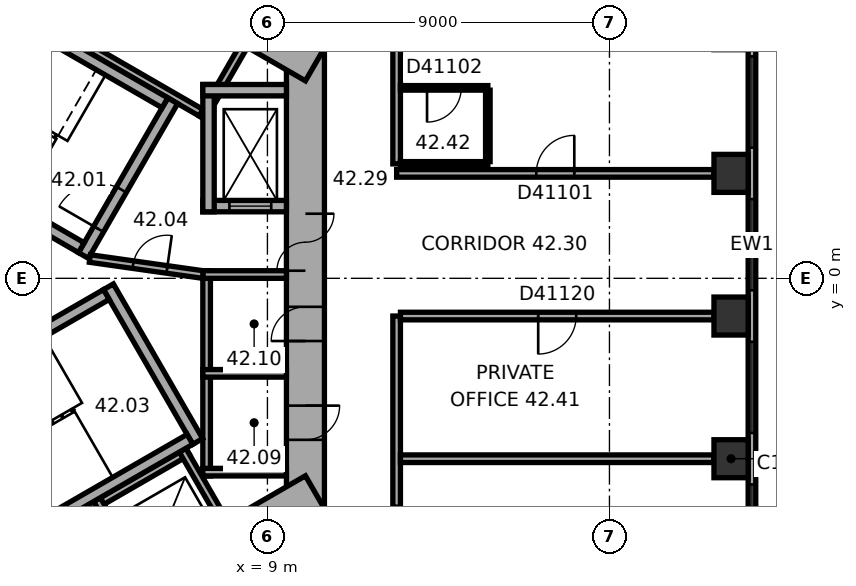
"""IFC4 building model, lengths in metres.
Left out: names, types, materials, properties, quantities, classifications, styles, units other than length and angle.
Written with IfcOpenShell. Run it as: python <this file> out.ifc"""

import sys

from ifc_helpers import new_model, si_unit, direction, frame, frame_2d, origin, origin_2d, place, context, subcontext, project, spatial, rectangle, extrude, element, fill, save


model = new_model("IFC4")
c1 = context("Model", 3, precision=1e-05, world=origin(), true_north=direction((0.0, 1.0)))
c2 = subcontext(c1, "Body", "Model", "MODEL_VIEW")
j1 = project(units=[si_unit("LENGTHUNIT", "METRE"), si_unit("PLANEANGLEUNIT", "RADIAN")], contexts=[c1])
p1 = place(None, origin())
s1 = spatial("IfcSite", under=j1, at=p1, CompositionType="ELEMENT")
p2 = place(p1, origin())
s2 = spatial("IfcBuilding", under=s1, at=p2, CompositionType="ELEMENT")
p3 = place(p2, frame((0.0, 0.0, 172.5)))
s3 = spatial("IfcBuildingStorey", under=s2, at=p3, CompositionType="ELEMENT", Elevation=172.5)
for number, where, z_axis, x_axis in (
    (1, (21.2, -4.747, 0.0), (0.0, 0.0, 1.0), (0.0, 1.0, 0.0)),
    (2, (21.2, -0.993, 0.0), (0.0, 0.0, 1.0), (0.0, 1.0, 0.0)),
    (3, (21.2, 2.761, 0.0), (0.0, 0.0, 1.0), (0.0, 1.0, 0.0)),
):
    element("IfcColumn", number, at=place(p3, frame(where, z_axis=z_axis, x_axis=x_axis)), inside=s3, PredefinedType="COLUMN", context=c2, shape_type="SweptSolid", body=[
        extrude(rectangle(XDim=1.0, YDim=0.9, at=origin_2d()), origin(), (0.0, 0.0, 1.0), 3.7),
    ])
p4 = place(p3, frame((10.0, -6.062, 0.0), z_axis=(0.0, 0.0, 1.0), x_axis=(0.0, 1.0, 0.0)))
e4 = element("IfcWall", 4, at=p4, inside=s3, PredefinedType="SHEAR", context=c2, shape_type="SweptSolid", body=[
    extrude(rectangle(XDim=12.125, YDim=1.0, at=frame_2d((6.062, 0.0))), origin(), (0.0, 0.0, 1.0), 3.7),
])
p5 = place(p4, frame((6.262, 0.0, 0.0)))
e5 = element("IfcOpeningElement", 5, at=p5, cuts=e4, PredefinedType="OPENING", context=c2, shape_type="SweptSolid", body=[
    extrude(rectangle(XDim=1.5, YDim=2.1, at=frame_2d((0.75, 1.05))), frame((0.0, 0.51, 0.0), z_axis=(0.0, -1.0, 0.0), x_axis=(1.0, 0.0, 0.0)), (0.0, 0.0, 1.0), 1.02),
])
p6 = place(p4, frame((1.812, 0.0, 0.0)))
e6 = element("IfcOpeningElement", 6, at=p6, cuts=e4, PredefinedType="OPENING", context=c2, shape_type="SweptSolid", body=[
    extrude(rectangle(XDim=0.9, YDim=2.1, at=frame_2d((0.45, 1.05))), frame((0.0, 0.51, 0.0), z_axis=(0.0, -1.0, 0.0), x_axis=(1.0, 0.0, 0.0)), (0.0, 0.0, 1.0), 1.02),
])
p7 = place(p4, frame((4.412, 0.0, 0.0)))
e7 = element("IfcOpeningElement", 7, at=p7, cuts=e4, PredefinedType="OPENING", context=c2, shape_type="SweptSolid", body=[
    extrude(rectangle(XDim=0.9, YDim=2.1, at=frame_2d((0.45, 1.05))), frame((0.0, 0.51, 0.0), z_axis=(0.0, -1.0, 0.0), x_axis=(1.0, 0.0, 0.0)), (0.0, 0.0, 1.0), 1.02),
])
p8 = place(p3, frame((10.25, 5.629, 0.0), z_axis=(0.0, 0.0, 1.0), x_axis=(-0.866022616891, 0.50000482701, 0.0)))
e8 = element("IfcWall", 8, at=p8, inside=s3, PredefinedType="SHEAR", context=c2, shape_type="SweptSolid", body=[
    extrude(rectangle(XDim=12.125, YDim=1.0, at=frame_2d((6.062, 0.0))), origin(), (0.0, 0.0, 1.0), 3.7),
])
p9 = place(p8, frame((4.012, 0.0, 0.0)))
e9 = element("IfcOpeningElement", 9, at=p9, cuts=e8, PredefinedType="OPENING", context=c2, shape_type="SweptSolid", body=[
    extrude(rectangle(XDim=0.9, YDim=2.1, at=frame_2d((0.45, 1.05))), frame((0.0, 0.51, 0.0), z_axis=(0.0, -1.0, 0.0), x_axis=(1.0, 0.0, 0.0)), (0.0, 0.0, 1.0), 1.02),
])
p10 = place(p8, frame((7.912, 0.0, 0.0)))
e10 = element("IfcOpeningElement", 10, at=p10, cuts=e8, PredefinedType="OPENING", context=c2, shape_type="SweptSolid", body=[
    extrude(rectangle(XDim=0.9, YDim=2.1, at=frame_2d((0.45, 1.05))), frame((0.0, 0.51, 0.0), z_axis=(0.0, -1.0, 0.0), x_axis=(1.0, 0.0, 0.0)), (0.0, 0.0, 1.0), 1.02),
])
p11 = place(p3, frame((-0.25, -11.691, 0.0), z_axis=(0.0, 0.0, 1.0), x_axis=(0.866022616891, 0.50000482701, 0.0)))
e11 = element("IfcWall", 11, at=p11, inside=s3, PredefinedType="SHEAR", context=c2, shape_type="SweptSolid", body=[
    extrude(rectangle(XDim=12.125, YDim=1.0, at=frame_2d((6.062, 0.0))), origin(), (0.0, 0.0, 1.0), 3.7),
])
p12 = place(p11, frame((2.612, 0.0, 0.0)))
e12 = element("IfcOpeningElement", 12, at=p12, cuts=e11, PredefinedType="OPENING", context=c2, shape_type="SweptSolid", body=[
    extrude(rectangle(XDim=1.1, YDim=2.1, at=frame_2d((0.55, 1.05))), frame((0.0, 0.51, 0.0), z_axis=(0.0, -1.0, 0.0), x_axis=(1.0, 0.0, 0.0)), (0.0, 0.0, 1.0), 1.02),
])
p13 = place(p11, frame((5.212, 0.0, 0.0)))
e13 = element("IfcOpeningElement", 13, at=p13, cuts=e11, PredefinedType="OPENING", context=c2, shape_type="SweptSolid", body=[
    extrude(rectangle(XDim=1.1, YDim=2.1, at=frame_2d((0.55, 1.05))), frame((0.0, 0.51, 0.0), z_axis=(0.0, -1.0, 0.0), x_axis=(1.0, 0.0, 0.0)), (0.0, 0.0, 1.0), 1.02),
])
p14 = place(p11, frame((7.812, 0.0, 0.0)))
e14 = element("IfcOpeningElement", 14, at=p14, cuts=e11, PredefinedType="OPENING", context=c2, shape_type="SweptSolid", body=[
    extrude(rectangle(XDim=1.1, YDim=2.1, at=frame_2d((0.55, 1.05))), frame((0.0, 0.51, 0.0), z_axis=(0.0, -1.0, 0.0), x_axis=(1.0, 0.0, 0.0)), (0.0, 0.0, 1.0), 1.02),
])
p15 = place(p3, frame((21.75, -9.138, 0.0), z_axis=(0.0, 0.0, 1.0), x_axis=(0.0, 1.0, 0.0)))
e15 = element("IfcWall", 15, at=p15, inside=s3, PredefinedType="STANDARD", context=c2, shape_type="SweptSolid", body=[
    extrude(rectangle(XDim=20.044, YDim=0.2, at=frame_2d((10.022, 0.0))), origin(), (0.0, 0.0, 1.0), 3.7),
])
p16 = place(p15, frame((1.314, 0.0, 0.9)))
e16 = element("IfcOpeningElement", 16, at=p16, cuts=e15, PredefinedType="OPENING", context=c2, shape_type="SweptSolid", body=[
    extrude(rectangle(XDim=2.4, YDim=2.0, at=frame_2d((1.2, 1.0))), frame((0.0, 0.11, 0.0), z_axis=(0.0, -1.0, 0.0), x_axis=(1.0, 0.0, 0.0)), (0.0, 0.0, 1.0), 0.22),
])
p17 = place(p15, frame((5.069, 0.0, 0.9)))
e17 = element("IfcOpeningElement", 17, at=p17, cuts=e15, PredefinedType="OPENING", context=c2, shape_type="SweptSolid", body=[
    extrude(rectangle(XDim=2.4, YDim=2.0, at=frame_2d((1.2, 1.0))), frame((0.0, 0.11, 0.0), z_axis=(0.0, -1.0, 0.0), x_axis=(1.0, 0.0, 0.0)), (0.0, 0.0, 1.0), 0.22),
])
p18 = place(p15, frame((8.823, 0.0, 0.9)))
e18 = element("IfcOpeningElement", 18, at=p18, cuts=e15, PredefinedType="OPENING", context=c2, shape_type="SweptSolid", body=[
    extrude(rectangle(XDim=2.4, YDim=2.0, at=frame_2d((1.2, 1.0))), frame((0.0, 0.11, 0.0), z_axis=(0.0, -1.0, 0.0), x_axis=(1.0, 0.0, 0.0)), (0.0, 0.0, 1.0), 0.22),
])
p19 = place(p15, frame((12.577, 0.0, 0.9)))
e19 = element("IfcOpeningElement", 19, at=p19, cuts=e15, PredefinedType="OPENING", context=c2, shape_type="SweptSolid", body=[
    extrude(rectangle(XDim=2.4, YDim=2.0, at=frame_2d((1.2, 1.0))), frame((0.0, 0.11, 0.0), z_axis=(0.0, -1.0, 0.0), x_axis=(1.0, 0.0, 0.0)), (0.0, 0.0, 1.0), 0.22),
])
p20 = place(p15, frame((16.331, 0.0, 0.9)))
e20 = element("IfcOpeningElement", 20, at=p20, cuts=e15, PredefinedType="OPENING", context=c2, shape_type="SweptSolid", body=[
    extrude(rectangle(XDim=2.4, YDim=2.0, at=frame_2d((1.2, 1.0))), frame((0.0, 0.11, 0.0), z_axis=(0.0, -1.0, 0.0), x_axis=(1.0, 0.0, 0.0)), (0.0, 0.0, 1.0), 0.22),
])
p21 = place(p3, frame((7.4, -5.2, 0.0), z_axis=(0.0, 0.0, 1.0), x_axis=(0.0, 1.0, 0.0)))
e21 = element("IfcWall", 21, at=p21, inside=s3, PredefinedType="PARTITIONING", context=c2, shape_type="SweptSolid", body=[
    extrude(rectangle(XDim=5.4, YDim=0.2, at=frame_2d((2.7, 0.0))), origin(), (0.0, 0.0, 1.0), 3.42),
])
for number, where, z_axis, x_axis in (
    (22, (7.3, -5.1, 0.0), (0.0, 0.0, 1.0), (1.0, 0.0, 0.0)),
    (23, (7.3, -2.5, 0.0), (0.0, 0.0, 1.0), (1.0, 0.0, 0.0)),
    (24, (7.3, 0.1, 0.0), (0.0, 0.0, 1.0), (1.0, 0.0, 0.0)),
):
    element("IfcWall", number, at=place(p3, frame(where, z_axis=z_axis, x_axis=x_axis)), inside=s3, PredefinedType="PARTITIONING", context=c2, shape_type="SweptSolid", body=[
        extrude(rectangle(XDim=2.2, YDim=0.2, at=frame_2d((1.1, 0.0))), origin(), (0.0, 0.0, 1.0), 3.42),
    ])
p22 = place(p3, frame((7.424, 4.259, 0.0), z_axis=(0.0, 0.0, 1.0), x_axis=(-0.866026010844, 0.49999894854, 0.0)))
e25 = element("IfcWall", 25, at=p22, inside=s3, PredefinedType="PARTITIONING", context=c2, shape_type="SweptSolid", body=[
    extrude(rectangle(XDim=8.0, YDim=0.2, at=frame_2d((4.0, 0.0))), origin(), (0.0, 0.0, 1.0), 3.42),
])
p23 = place(p3, frame((7.287, 4.222, 0.0), z_axis=(0.0, 0.0, 1.0), x_axis=(0.499946605688, 0.86605622881, 0.0)))
e26 = element("IfcWall", 26, at=p23, inside=s3, PredefinedType="PARTITIONING", context=c2, shape_type="SweptSolid", body=[
    extrude(rectangle(XDim=2.2, YDim=0.2, at=frame_2d((1.1, 0.0))), origin(), (0.0, 0.0, 1.0), 3.42),
])
p24 = place(p3, frame((-0.024, -8.559, 0.0), z_axis=(0.0, 0.0, 1.0), x_axis=(0.866026010844, 0.49999894854, 0.0)))
e27 = element("IfcWall", 27, at=p24, inside=s3, PredefinedType="PARTITIONING", context=c2, shape_type="SweptSolid", body=[
    extrude(rectangle(XDim=8.0, YDim=0.2, at=frame_2d((4.0, 0.0))), origin(), (0.0, 0.0, 1.0), 3.42),
])
for number, where, z_axis, x_axis in (
    (28, (4.516, -5.822, 0.0), (0.0, 0.0, 1.0), (0.5, -0.866, 0.0)),
    (29, (6.768, -4.522, 0.0), (0.0, 0.0, 1.0), (0.5, -0.866, 0.0)),
):
    element("IfcWall", number, at=place(p3, frame(where, z_axis=z_axis, x_axis=x_axis)), inside=s3, PredefinedType="PARTITIONING", context=c2, shape_type="SweptSolid", body=[
        extrude(rectangle(XDim=2.2, YDim=0.2, at=frame_2d((1.1, 0.0))), origin(), (0.0, 0.0, 1.0), 3.42),
    ])
p25 = place(p3, frame((4.158, 0.602, 0.0), z_axis=(0.0, 0.0, 1.0), x_axis=(0.499977259774, 0.866038532462, 0.0)))
e30 = element("IfcWall", 30, at=p25, inside=s3, PredefinedType="SHEAR", context=c2, shape_type="SweptSolid", body=[
    extrude(rectangle(XDim=4.7, YDim=0.3, at=frame_2d((2.35, 0.0))), origin(), (0.0, 0.0, 1.0), 3.42),
])
p26 = place(p25, frame((0.8, 0.0, 0.0)))
e31 = element("IfcOpeningElement", 31, at=p26, cuts=e30, PredefinedType="OPENING", context=c2, shape_type="SweptSolid", body=[
    extrude(rectangle(XDim=1.2, YDim=2.1, at=frame_2d((0.6, 1.05))), frame((0.0, 0.16, 0.0), z_axis=(0.0, -1.0, 0.0), x_axis=(1.0, 0.0, 0.0)), (0.0, 0.0, 1.0), 0.32),
])
for number, where, z_axis, x_axis in (
    (32, (4.103, 0.807, 0.0), (0.0, 0.0, 1.0), (-0.866, 0.5, 0.0)),
    (33, (6.303, 4.617, 0.0), (0.0, 0.0, 1.0), (-0.866, 0.5, 0.0)),
):
    element("IfcWall", number, at=place(p3, frame(where, z_axis=z_axis, x_axis=x_axis)), inside=s3, PredefinedType="SHEAR", context=c2, shape_type="SweptSolid", body=[
        extrude(rectangle(XDim=7.06, YDim=0.3, at=frame_2d((3.53, 0.0))), origin(), (0.0, 0.0, 1.0), 3.42),
    ])
p27 = place(p3, frame((4.816, -0.222, 0.0), z_axis=(0.0, 0.0, 1.0), x_axis=(0.499977259774, -0.866038532462, 0.0)))
e34 = element("IfcWall", 34, at=p27, inside=s3, PredefinedType="SHEAR", context=c2, shape_type="SweptSolid", body=[
    extrude(rectangle(XDim=4.7, YDim=0.3, at=frame_2d((2.35, 0.0))), origin(), (0.0, 0.0, 1.0), 3.42),
])
for number, where, z_axis, x_axis in (
    (35, (-1.353, -3.957, 0.0), (0.0, 0.0, 1.0), (0.866, 0.5, 0.0)),
    (36, (0.847, -7.767, 0.0), (0.0, 0.0, 1.0), (0.866, 0.5, 0.0)),
):
    element("IfcWall", number, at=place(p3, frame(where, z_axis=z_axis, x_axis=x_axis)), inside=s3, PredefinedType="SHEAR", context=c2, shape_type="SweptSolid", body=[
        extrude(rectangle(XDim=7.06, YDim=0.3, at=frame_2d((3.53, 0.0))), origin(), (0.0, 0.0, 1.0), 3.42),
    ])
p28 = place(p3, frame((7.3, 1.9, 0.0), z_axis=(0.0, 0.0, 1.0), x_axis=(1.0, 0.0, 0.0)))
e37 = element("IfcWall", 37, at=p28, inside=s3, PredefinedType="SHEAR", context=c2, shape_type="SweptSolid", body=[
    extrude(rectangle(XDim=2.2, YDim=0.3, at=frame_2d((1.1, 0.0))), origin(), (0.0, 0.0, 1.0), 3.42),
])
p29 = place(p28, frame((0.7, 0.0, 0.0)))
e38 = element("IfcOpeningElement", 38, at=p29, cuts=e37, PredefinedType="OPENING", context=c2, shape_type="SweptSolid", body=[
    extrude(rectangle(XDim=1.1, YDim=2.1, at=frame_2d((0.55, 1.05))), frame((0.0, 0.16, 0.0), z_axis=(0.0, -1.0, 0.0), x_axis=(1.0, 0.0, 0.0)), (0.0, 0.0, 1.0), 0.32),
])
p30 = place(p3, frame((7.45, 1.75, 0.0), z_axis=(0.0, 0.0, 1.0), x_axis=(0.0, 1.0, 0.0)))
e39 = element("IfcWall", 39, at=p30, inside=s3, PredefinedType="SHEAR", context=c2, shape_type="SweptSolid", body=[
    extrude(rectangle(XDim=3.35, YDim=0.3, at=frame_2d((1.675, 0.0))), origin(), (0.0, 0.0, 1.0), 3.42),
])
p31 = place(p3, frame((7.3, 4.95, 0.0), z_axis=(0.0, 0.0, 1.0), x_axis=(1.0, 0.0, 0.0)))
e40 = element("IfcWall", 40, at=p31, inside=s3, PredefinedType="SHEAR", context=c2, shape_type="SweptSolid", body=[
    extrude(rectangle(XDim=2.2, YDim=0.3, at=frame_2d((1.1, 0.0))), origin(), (0.0, 0.0, 1.0), 3.42),
])
p32 = place(p3, frame((4.327, 0.521, 0.0), z_axis=(0.0, 0.0, 1.0), x_axis=(0.990124376366, -0.14019172346, 0.0)))
e41 = element("IfcWall", 41, at=p32, inside=s3, PredefinedType="PARTITIONING", context=c2, shape_type="SweptSolid", body=[
    extrude(rectangle(XDim=3.002, YDim=0.2, at=frame_2d((1.501, 0.0))), origin(), (0.0, 0.0, 1.0), 3.42),
])
p33 = place(p32, frame((1.15, 0.0, 0.0)))
e42 = element("IfcOpeningElement", 42, at=p33, cuts=e41, PredefinedType="OPENING", context=c2, shape_type="SweptSolid", body=[
    extrude(rectangle(XDim=0.9, YDim=2.1, at=frame_2d((0.45, 1.05))), frame((0.0, 0.11, 0.0), z_axis=(0.0, -1.0, 0.0), x_axis=(1.0, 0.0, 0.0)), (0.0, 0.0, 1.0), 0.22),
])
p34 = place(p3, frame((12.4, -6.022, 0.0), z_axis=(0.0, 0.0, 1.0), x_axis=(0.0, 1.0, 0.0)))
e43 = element("IfcWall", 43, at=p34, inside=s3, PredefinedType="PARTITIONING", context=c2, shape_type="SweptSolid", body=[
    extrude(rectangle(XDim=5.029, YDim=0.2, at=frame_2d((2.515, 0.0))), origin(), (0.0, 0.0, 1.0), 3.42),
])
p35 = place(p3, frame((12.4, 3.011, 0.0), z_axis=(0.0, 0.0, 1.0), x_axis=(0.0, 1.0, 0.0)))
e44 = element("IfcWall", 44, at=p35, inside=s3, PredefinedType="PARTITIONING", context=c2, shape_type="SweptSolid", body=[
    extrude(rectangle(XDim=3.051, YDim=0.2, at=frame_2d((1.525, 0.0))), origin(), (0.0, 0.0, 1.0), 3.42),
])
p36 = place(p3, frame((12.5, -0.993, 0.0), z_axis=(0.0, 0.0, 1.0), x_axis=(1.0, 0.0, 0.0)))
e45 = element("IfcWall", 45, at=p36, inside=s3, PredefinedType="PARTITIONING", context=c2, shape_type="SweptSolid", body=[
    extrude(rectangle(XDim=8.25, YDim=0.2, at=frame_2d((4.125, 0.0))), origin(), (0.0, 0.0, 1.0), 2.87),
])
p37 = place(p36, frame((3.625, 0.0, 0.0)))
e46 = element("IfcOpeningElement", 46, at=p37, cuts=e45, PredefinedType="OPENING", context=c2, shape_type="SweptSolid", body=[
    extrude(rectangle(XDim=1.0, YDim=2.1, at=frame_2d((0.5, 1.05))), frame((0.0, 0.11, 0.0), z_axis=(0.0, -1.0, 0.0), x_axis=(1.0, 0.0, 0.0)), (0.0, 0.0, 1.0), 0.22),
])
p38 = place(p3, frame((12.5, 5.011, 0.0), z_axis=(0.0, 0.0, 1.0), x_axis=(1.0, 0.0, 0.0)))
e47 = element("IfcWall", 47, at=p38, inside=s3, PredefinedType="PARTITIONING", context=c2, shape_type="SweptSolid", body=[
    extrude(rectangle(XDim=2.3, YDim=0.12, at=frame_2d((1.15, 0.0))), origin(), (0.0, 0.0, 1.0), 3.42),
])
p39 = place(p38, frame((0.7, 0.0, 0.0)))
e48 = element("IfcOpeningElement", 48, at=p39, cuts=e47, PredefinedType="OPENING", context=c2, shape_type="SweptSolid", body=[
    extrude(rectangle(XDim=0.9, YDim=2.1, at=frame_2d((0.45, 1.05))), frame((0.0, 0.07, 0.0), z_axis=(0.0, -1.0, 0.0), x_axis=(1.0, 0.0, 0.0)), (0.0, 0.0, 1.0), 0.14),
])
p40 = place(p3, frame((14.8, 3.011, 0.0), z_axis=(0.0, 0.0, 1.0), x_axis=(-1.0, 0.0, 0.0)))
e49 = element("IfcWall", 49, at=p40, inside=s3, PredefinedType="PARTITIONING", context=c2, shape_type="SweptSolid", body=[
    extrude(rectangle(XDim=2.3, YDim=0.12, at=frame_2d((1.15, 0.0))), origin(), (0.0, 0.0, 1.0), 3.42),
])
p41 = place(p3, frame((14.8, 4.951, 0.0), z_axis=(0.0, 0.0, 1.0), x_axis=(0.0, -1.0, 0.0)))
e50 = element("IfcWall", 50, at=p41, inside=s3, PredefinedType="PARTITIONING", context=c2, shape_type="SweptSolid", body=[
    extrude(rectangle(XDim=1.88, YDim=0.12, at=frame_2d((0.94, 0.0))), origin(), (0.0, 0.0, 1.0), 3.42),
])
p42 = place(p3, frame((20.75, -4.747, 0.0), z_axis=(0.0, 0.0, 1.0), x_axis=(-1.0, 0.0, 0.0)))
e51 = element("IfcWall", 51, at=p42, inside=s3, PredefinedType="PARTITIONING", context=c2, shape_type="SweptSolid", body=[
    extrude(rectangle(XDim=8.25, YDim=0.2, at=frame_2d((4.125, 0.0))), origin(), (0.0, 0.0, 1.0), 3.42),
])
p43 = place(p3, frame((20.75, 2.761, 0.0), z_axis=(0.0, 0.0, 1.0), x_axis=(-1.0, 0.0, 0.0)))
e52 = element("IfcWall", 52, at=p43, inside=s3, PredefinedType="PARTITIONING", context=c2, shape_type="SweptSolid", body=[
    extrude(rectangle(XDim=8.35, YDim=0.2, at=frame_2d((4.175, 0.0))), origin(), (0.0, 0.0, 1.0), 3.42),
])
p44 = place(p43, frame((3.675, 0.0, 0.0)))
e53 = element("IfcOpeningElement", 53, at=p44, cuts=e52, PredefinedType="OPENING", context=c2, shape_type="SweptSolid", body=[
    extrude(rectangle(XDim=1.0, YDim=2.1, at=frame_2d((0.5, 1.05))), frame((0.0, 0.11, 0.0), z_axis=(0.0, -1.0, 0.0), x_axis=(1.0, 0.0, 0.0)), (0.0, 0.0, 1.0), 0.22),
])
p45 = place(p16, origin())
e54 = element("IfcWindow", 54, at=p45, inside=s3, PartitioningType="SINGLE_PANEL", PredefinedType="WINDOW", context=c2, shape_type="SweptSolid", body=[
    extrude(rectangle(XDim=2.4, YDim=2.0, at=frame_2d((1.2, 1.0))), frame((0.0, 0.03, 0.0), z_axis=(0.0, -1.0, 0.0), x_axis=(1.0, 0.0, 0.0)), (0.0, 0.0, 1.0), 0.06),
])
fill(e16, e54)
p46 = place(p17, origin())
e55 = element("IfcWindow", 55, at=p46, inside=s3, PartitioningType="SINGLE_PANEL", PredefinedType="WINDOW", context=c2, shape_type="SweptSolid", body=[
    extrude(rectangle(XDim=2.4, YDim=2.0, at=frame_2d((1.2, 1.0))), frame((0.0, 0.03, 0.0), z_axis=(0.0, -1.0, 0.0), x_axis=(1.0, 0.0, 0.0)), (0.0, 0.0, 1.0), 0.06),
])
fill(e17, e55)
p47 = place(p18, origin())
e56 = element("IfcWindow", 56, at=p47, inside=s3, PartitioningType="SINGLE_PANEL", PredefinedType="WINDOW", context=c2, shape_type="SweptSolid", body=[
    extrude(rectangle(XDim=2.4, YDim=2.0, at=frame_2d((1.2, 1.0))), frame((0.0, 0.03, 0.0), z_axis=(0.0, -1.0, 0.0), x_axis=(1.0, 0.0, 0.0)), (0.0, 0.0, 1.0), 0.06),
])
fill(e18, e56)
p48 = place(p19, origin())
e57 = element("IfcWindow", 57, at=p48, inside=s3, PartitioningType="SINGLE_PANEL", PredefinedType="WINDOW", context=c2, shape_type="SweptSolid", body=[
    extrude(rectangle(XDim=2.4, YDim=2.0, at=frame_2d((1.2, 1.0))), frame((0.0, 0.03, 0.0), z_axis=(0.0, -1.0, 0.0), x_axis=(1.0, 0.0, 0.0)), (0.0, 0.0, 1.0), 0.06),
])
fill(e19, e57)
p49 = place(p5, origin())
e58 = element("IfcDoor", 58, at=p49, inside=s3, OperationType="DOUBLE_DOOR_SINGLE_SWING", PredefinedType="DOOR", context=c2, shape_type="SweptSolid", body=[
    extrude(rectangle(XDim=1.5, YDim=2.1, at=frame_2d((0.75, 1.05))), frame((0.0, 0.025, 0.0), z_axis=(0.0, -1.0, 0.0), x_axis=(1.0, 0.0, 0.0)), (0.0, 0.0, 1.0), 0.05),
])
fill(e5, e58)
p50 = place(p26, origin())
e59 = element("IfcDoor", 59, at=p50, inside=s3, OperationType="SINGLE_SWING_RIGHT", PredefinedType="DOOR", context=c2, shape_type="SweptSolid", body=[
    extrude(rectangle(XDim=1.2, YDim=2.1, at=frame_2d((0.6, 1.05))), frame((0.0, 0.025, 0.0), z_axis=(0.0, -1.0, 0.0), x_axis=(1.0, 0.0, 0.0)), (0.0, 0.0, 1.0), 0.05),
])
fill(e31, e59)
p51 = place(p33, origin())
e60 = element("IfcDoor", 60, at=p51, inside=s3, OperationType="SINGLE_SWING_LEFT", PredefinedType="DOOR", context=c2, shape_type="SweptSolid", body=[
    extrude(rectangle(XDim=0.9, YDim=2.1, at=frame_2d((0.45, 1.05))), frame((0.0, 0.025, 0.0), z_axis=(0.0, -1.0, 0.0), x_axis=(1.0, 0.0, 0.0)), (0.0, 0.0, 1.0), 0.05),
])
fill(e42, e60)
p52 = place(p6, origin())
e61 = element("IfcDoor", 61, at=p52, inside=s3, OperationType="SINGLE_SWING_LEFT", PredefinedType="DOOR", context=c2, shape_type="SweptSolid", body=[
    extrude(rectangle(XDim=0.9, YDim=2.1, at=frame_2d((0.45, 1.05))), frame((0.0, 0.025, 0.0), z_axis=(0.0, -1.0, 0.0), x_axis=(1.0, 0.0, 0.0)), (0.0, 0.0, 1.0), 0.05),
])
fill(e6, e61)
p53 = place(p7, origin())
e62 = element("IfcDoor", 62, at=p53, inside=s3, OperationType="SINGLE_SWING_LEFT", PredefinedType="DOOR", context=c2, shape_type="SweptSolid", body=[
    extrude(rectangle(XDim=0.9, YDim=2.1, at=frame_2d((0.45, 1.05))), frame((0.0, 0.025, 0.0), z_axis=(0.0, -1.0, 0.0), x_axis=(1.0, 0.0, 0.0)), (0.0, 0.0, 1.0), 0.05),
])
fill(e7, e62)
p54 = place(p29, origin())
e63 = element("IfcDoor", 63, at=p54, inside=s3, OperationType="DOUBLE_DOOR_SLIDING", PredefinedType="DOOR", context=c2, shape_type="SweptSolid", body=[
    extrude(rectangle(XDim=1.1, YDim=2.1, at=frame_2d((0.55, 1.05))), frame((0.0, 0.025, 0.0), z_axis=(0.0, -1.0, 0.0), x_axis=(1.0, 0.0, 0.0)), (0.0, 0.0, 1.0), 0.05),
])
fill(e38, e63)
p55 = place(p44, origin())
e64 = element("IfcDoor", 64, at=p55, inside=s3, OperationType="SINGLE_SWING_LEFT", PredefinedType="DOOR", context=c2, shape_type="SweptSolid", body=[
    extrude(rectangle(XDim=1.0, YDim=2.1, at=frame_2d((0.5, 1.05))), frame((0.0, 0.025, 0.0), z_axis=(0.0, -1.0, 0.0), x_axis=(1.0, 0.0, 0.0)), (0.0, 0.0, 1.0), 0.05),
])
fill(e53, e64)
p56 = place(p39, origin())
e65 = element("IfcDoor", 65, at=p56, inside=s3, OperationType="SINGLE_SWING_LEFT", PredefinedType="DOOR", context=c2, shape_type="SweptSolid", body=[
    extrude(rectangle(XDim=0.9, YDim=2.1, at=frame_2d((0.45, 1.05))), frame((0.0, 0.025, 0.0), z_axis=(0.0, -1.0, 0.0), x_axis=(1.0, 0.0, 0.0)), (0.0, 0.0, 1.0), 0.05),
])
fill(e48, e65)
p57 = place(p37, origin())
e66 = element("IfcDoor", 66, at=p57, inside=s3, OperationType="SINGLE_SWING_LEFT", PredefinedType="DOOR", context=c2, shape_type="SweptSolid", body=[
    extrude(rectangle(XDim=1.0, YDim=2.1, at=frame_2d((0.5, 1.05))), frame((0.0, 0.025, 0.0), z_axis=(0.0, -1.0, 0.0), x_axis=(1.0, 0.0, 0.0)), (0.0, 0.0, 1.0), 0.05),
])
fill(e46, e66)
save(model, sys.argv[1])
